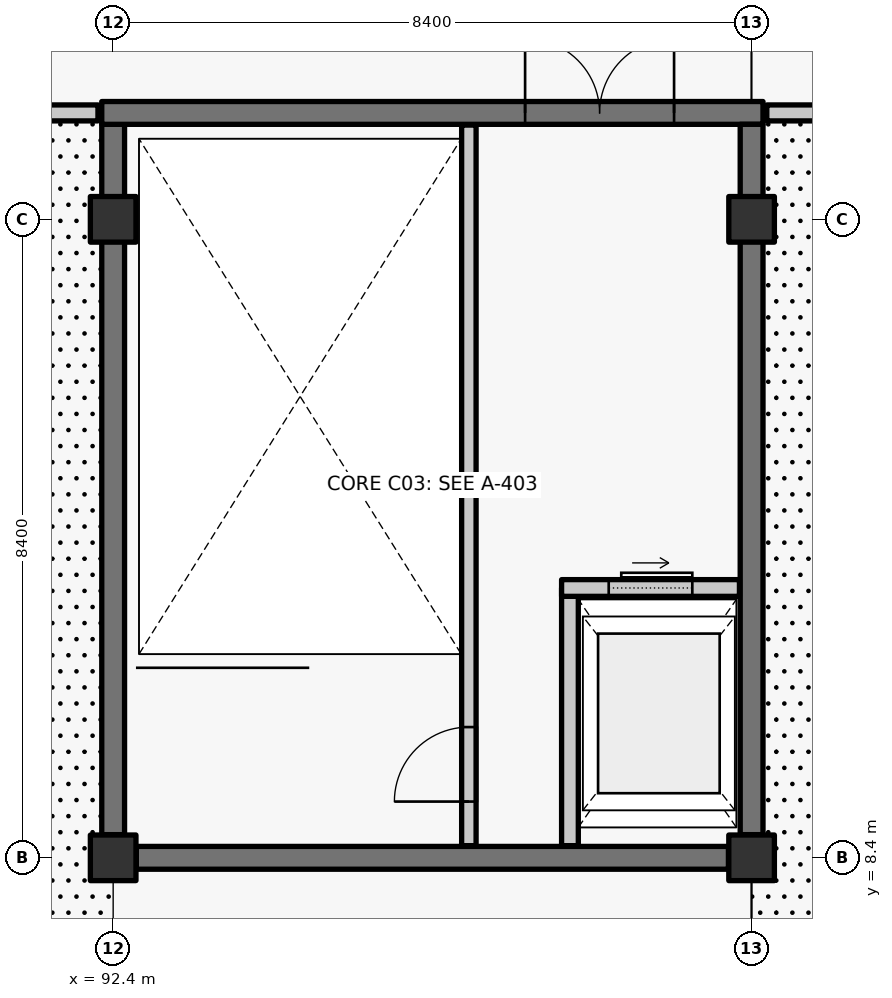
"""IFC4 building model, lengths in metres.
Left out: names, types, materials, properties, quantities, classifications, styles, units other than length and angle.
Written with IfcOpenShell. Run it as: python <this file> out.ifc"""

import sys

from ifc_helpers import new_model, si_unit, direction, frame, frame_2d, origin, origin_2d, place, context, subcontext, project, spatial, rectangle, extrude, element, fill, save


model = new_model("IFC4")
c1 = context("Model", 3, precision=1e-05, world=origin(), true_north=direction((0.0, 1.0)))
c2 = subcontext(c1, "Body", "Model", "MODEL_VIEW")
j1 = project(units=[si_unit("LENGTHUNIT", "METRE"), si_unit("PLANEANGLEUNIT", "RADIAN")], contexts=[c1])
p1 = place(None, origin())
s1 = spatial("IfcSite", under=j1, at=p1, CompositionType="ELEMENT")
p2 = place(p1, origin())
s2 = spatial("IfcBuilding", under=s1, at=p2, CompositionType="ELEMENT")
p3 = place(p2, frame((0.0, 0.0, 16.2)))
s3 = spatial("IfcBuildingStorey", under=s2, at=p3, CompositionType="ELEMENT", Elevation=16.2)
for number, where, z_axis, x_axis in (
    (1, (92.4, 8.4, 0.0), (0.0, 0.0, 1.0), (1.0, 0.0, 0.0)),
    (2, (92.4, 16.8, 0.0), (0.0, 0.0, 1.0), (1.0, 0.0, 0.0)),
    (3, (100.8, 8.4, 0.0), (0.0, 0.0, 1.0), (1.0, 0.0, 0.0)),
    (4, (100.8, 16.8, 0.0), (0.0, 0.0, 1.0), (1.0, 0.0, 0.0)),
):
    element("IfcColumn", number, at=place(p3, frame(where, z_axis=z_axis, x_axis=x_axis)), inside=s3, PredefinedType="COLUMN", context=c2, shape_type="SweptSolid", body=[
        extrude(rectangle(XDim=0.6, YDim=0.6, at=origin_2d()), origin(), (0.0, 0.0, 1.0), 4.26),
    ])
p4 = place(p3, frame((100.495, 8.4, 0.0), z_axis=(0.0, 0.0, 1.0), x_axis=(-1.0, 0.0, 0.0)))
e5 = element("IfcWall", 5, at=p4, inside=s3, PredefinedType="SHEAR", context=c2, shape_type="SweptSolid", body=[
    extrude(rectangle(XDim=7.79, YDim=0.3, at=frame_2d((3.895, 0.0))), origin(), (0.0, 0.0, 1.0), 4.26),
])
p5 = place(p3, frame((92.4, 8.705, 0.0), z_axis=(0.0, 0.0, 1.0), x_axis=(0.0, 1.0, 0.0)))
e6 = element("IfcWall", 6, at=p5, inside=s3, PredefinedType="SHEAR", context=c2, shape_type="SweptSolid", body=[
    extrude(rectangle(XDim=9.345, YDim=0.3, at=frame_2d((4.672, 0.0))), origin(), (0.0, 0.0, 1.0), 4.26),
])
p6 = place(p3, frame((92.25, 18.2, 0.0), z_axis=(0.0, 0.0, 1.0), x_axis=(1.0, 0.0, 0.0)))
e7 = element("IfcWall", 7, at=p6, inside=s3, PredefinedType="SHEAR", context=c2, shape_type="SweptSolid", body=[
    extrude(rectangle(XDim=8.7, YDim=0.3, at=frame_2d((4.35, 0.0))), origin(), (0.0, 0.0, 1.0), 4.26),
])
p7 = place(p6, frame((5.57, 0.0, 0.0)))
e8 = element("IfcOpeningElement", 8, at=p7, cuts=e7, PredefinedType="OPENING", context=c2, shape_type="SweptSolid", body=[
    extrude(rectangle(XDim=1.96, YDim=2.2, at=frame_2d((0.98, 1.1))), frame((0.0, 0.16, 0.0), z_axis=(0.0, -1.0, 0.0), x_axis=(1.0, 0.0, 0.0)), (0.0, 0.0, 1.0), 0.32),
])
p8 = place(p3, frame((100.8, 18.05, 0.0), z_axis=(0.0, 0.0, 1.0), x_axis=(0.0, -1.0, 0.0)))
e9 = element("IfcWall", 9, at=p8, inside=s3, PredefinedType="SHEAR", context=c2, shape_type="SweptSolid", body=[
    extrude(rectangle(XDim=9.345, YDim=0.3, at=frame_2d((4.672, 0.0))), origin(), (0.0, 0.0, 1.0), 4.26),
])
p9 = place(p3, frame((97.08, 8.56, 0.0), z_axis=(0.0, 0.0, 1.0), x_axis=(0.0, 1.0, 0.0)))
e10 = element("IfcWall", 10, at=p9, inside=s3, PredefinedType="SOLIDWALL", context=c2, shape_type="SweptSolid", body=[
    extrude(rectangle(XDim=9.48, YDim=0.19, at=frame_2d((4.74, 0.0))), origin(), (0.0, 0.0, 1.0), 4.26),
])
p10 = place(p9, frame((0.58, 0.0, 0.0)))
e11 = element("IfcOpeningElement", 11, at=p10, cuts=e10, PredefinedType="OPENING", context=c2, shape_type="SweptSolid", body=[
    extrude(rectangle(XDim=0.98, YDim=2.15, at=frame_2d((0.49, 1.075))), frame((0.0, 0.105, 0.0), z_axis=(0.0, -1.0, 0.0), x_axis=(1.0, 0.0, 0.0)), (0.0, 0.0, 1.0), 0.21),
])
p11 = place(p3, frame((98.41, 8.56, 0.0), z_axis=(0.0, 0.0, 1.0), x_axis=(0.0, 1.0, 0.0)))
e12 = element("IfcWall", 12, at=p11, inside=s3, PredefinedType="SOLIDWALL", context=c2, shape_type="SweptSolid", body=[
    extrude(rectangle(XDim=3.39, YDim=0.22, at=frame_2d((1.695, 0.0))), origin(), (0.0, 0.0, 1.0), 4.26),
])
p12 = place(p3, frame((98.3, 11.95, 0.0), z_axis=(0.0, 0.0, 1.0), x_axis=(1.0, 0.0, 0.0)))
e13 = element("IfcWall", 13, at=p12, inside=s3, PredefinedType="SOLIDWALL", context=c2, shape_type="SweptSolid", body=[
    extrude(rectangle(XDim=2.34, YDim=0.22, at=frame_2d((1.17, 0.0))), origin(), (0.0, 0.0, 1.0), 4.26),
])
p13 = place(p12, frame((0.62, 0.0, 0.0)))
e14 = element("IfcOpeningElement", 14, at=p13, cuts=e13, PredefinedType="OPENING", context=c2, shape_type="SweptSolid", body=[
    extrude(rectangle(XDim=1.1, YDim=2.2, at=frame_2d((0.55, 1.1))), frame((0.0, 0.12, 0.0), z_axis=(0.0, -1.0, 0.0), x_axis=(1.0, 0.0, 0.0)), (0.0, 0.0, 1.0), 0.24),
])
p14 = place(p3, frame((75.8, 18.2, 0.0), z_axis=(0.0, 0.0, 1.0), x_axis=(1.0, 0.0, 0.0)))
e15 = element("IfcWall", 15, at=p14, inside=s3, PredefinedType="PARTITIONING", context=c2, shape_type="SweptSolid", body=[
    extrude(rectangle(XDim=16.4, YDim=0.21, at=frame_2d((8.2, 0.0))), origin(), (0.0, 0.0, 1.0), 4.26),
])
p15 = place(p14, frame((3.5, 0.0, 0.0)))
e16 = element("IfcOpeningElement", 16, at=p15, cuts=e15, PredefinedType="OPENING", context=c2, shape_type="SweptSolid", body=[
    extrude(rectangle(XDim=1.0, YDim=2.15, at=frame_2d((0.5, 1.075))), frame((0.0, 0.115, 0.0), z_axis=(0.0, -1.0, 0.0), x_axis=(1.0, 0.0, 0.0)), (0.0, 0.0, 1.0), 0.23),
])
p16 = place(p14, frame((11.9, 0.0, 0.0)))
e17 = element("IfcOpeningElement", 17, at=p16, cuts=e15, PredefinedType="OPENING", context=c2, shape_type="SweptSolid", body=[
    extrude(rectangle(XDim=1.0, YDim=2.15, at=frame_2d((0.5, 1.075))), frame((0.0, 0.115, 0.0), z_axis=(0.0, -1.0, 0.0), x_axis=(1.0, 0.0, 0.0)), (0.0, 0.0, 1.0), 0.23),
])
p17 = place(p3, frame((101.0, 18.2, 0.0), z_axis=(0.0, 0.0, 1.0), x_axis=(1.0, 0.0, 0.0)))
e18 = element("IfcWall", 18, at=p17, inside=s3, PredefinedType="PARTITIONING", context=c2, shape_type="SweptSolid", body=[
    extrude(rectangle(XDim=16.4, YDim=0.21, at=frame_2d((8.2, 0.0))), origin(), (0.0, 0.0, 1.0), 4.26),
])
p18 = place(p17, frame((3.24, 0.0, 0.0)))
e19 = element("IfcOpeningElement", 19, at=p18, cuts=e18, PredefinedType="OPENING", context=c2, shape_type="SweptSolid", body=[
    extrude(rectangle(XDim=1.52, YDim=2.18, at=frame_2d((0.76, 1.09))), frame((0.0, 0.115, 0.0), z_axis=(0.0, -1.0, 0.0), x_axis=(1.0, 0.0, 0.0)), (0.0, 0.0, 1.0), 0.23),
])
p19 = place(p17, frame((11.64, 0.0, 0.0)))
e20 = element("IfcOpeningElement", 20, at=p19, cuts=e18, PredefinedType="OPENING", context=c2, shape_type="SweptSolid", body=[
    extrude(rectangle(XDim=1.52, YDim=2.18, at=frame_2d((0.76, 1.09))), frame((0.0, 0.115, 0.0), z_axis=(0.0, -1.0, 0.0), x_axis=(1.0, 0.0, 0.0)), (0.0, 0.0, 1.0), 0.23),
])
p20 = place(p10, origin())
e21 = element("IfcDoor", 21, at=p20, inside=s3, OperationType="SINGLE_SWING_LEFT", PredefinedType="DOOR", context=c2, shape_type="SweptSolid", body=[
    extrude(rectangle(XDim=0.98, YDim=2.15, at=frame_2d((0.49, 1.075))), frame((0.0, 0.025, 0.0), z_axis=(0.0, -1.0, 0.0), x_axis=(1.0, 0.0, 0.0)), (0.0, 0.0, 1.0), 0.05),
])
fill(e11, e21)
p21 = place(p7, origin())
e22 = element("IfcDoor", 22, at=p21, inside=s3, OperationType="DOUBLE_DOOR_SINGLE_SWING", PredefinedType="DOOR", context=c2, shape_type="SweptSolid", body=[
    extrude(rectangle(XDim=1.96, YDim=2.2, at=frame_2d((0.98, 1.1))), frame((0.0, 0.025, 0.0), z_axis=(0.0, -1.0, 0.0), x_axis=(1.0, 0.0, 0.0)), (0.0, 0.0, 1.0), 0.05),
])
fill(e8, e22)
p22 = place(p13, origin())
e23 = element("IfcDoor", 23, at=p22, inside=s3, OperationType="SLIDING_TO_RIGHT", PredefinedType="DOOR", context=c2, shape_type="SweptSolid", body=[
    extrude(rectangle(XDim=1.1, YDim=2.2, at=frame_2d((0.55, 1.1))), frame((0.0, 0.025, 0.0), z_axis=(0.0, -1.0, 0.0), x_axis=(1.0, 0.0, 0.0)), (0.0, 0.0, 1.0), 0.05),
])
fill(e14, e23)
save(model, sys.argv[1])
